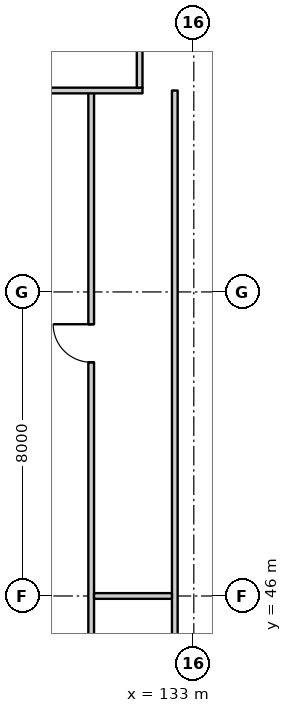
"""IFC4 building model, lengths in metres.
Left out: names, types, materials, properties, quantities, classifications, styles, units other than length and angle.
Written with IfcOpenShell. Run it as: python <this file> out.ifc"""

import sys

from ifc_helpers import new_model, si_unit, direction, frame, frame_2d, origin, place, context, subcontext, project, spatial, rectangle, extrude, element, fill, save


model = new_model("IFC4")
c1 = context("Model", 3, precision=1e-05, world=origin(), true_north=direction((0.0, 1.0)))
c2 = subcontext(c1, "Body", "Model", "MODEL_VIEW")
j1 = project(units=[si_unit("LENGTHUNIT", "METRE"), si_unit("PLANEANGLEUNIT", "RADIAN")], contexts=[c1])
p1 = place(None, origin())
s1 = spatial("IfcSite", under=j1, at=p1, CompositionType="ELEMENT")
p2 = place(p1, origin())
s2 = spatial("IfcBuilding", under=s1, at=p2, CompositionType="ELEMENT")
p3 = place(p2, frame((0.0, 0.0, -5.0)))
s3 = spatial("IfcBuildingStorey", under=s2, at=p3, CompositionType="ELEMENT", Elevation=-5.0)
p4 = place(p3, frame((130.3, 32.7, 0.0), z_axis=(0.0, 0.0, 1.0), x_axis=(0.0, 1.0, 0.0)))
e1 = element("IfcWall", 1, at=p4, inside=s3, PredefinedType="PARTITIONING", context=c2, shape_type="SweptSolid", body=[
    extrude(rectangle(XDim=26.6, YDim=0.15, at=frame_2d((13.3, 0.0))), origin(), (0.0, 0.0, 1.0), 3.9),
])
p5 = place(p4, frame((6.15, 0.0, 0.0)))
e2 = element("IfcOpeningElement", 2, at=p5, cuts=e1, PredefinedType="OPENING", context=c2, shape_type="SweptSolid", body=[
    extrude(rectangle(XDim=1.0, YDim=2.1, at=frame_2d((0.5, 1.05))), frame((0.0, 0.085, 0.0), z_axis=(0.0, -1.0, 0.0), x_axis=(1.0, 0.0, 0.0)), (0.0, 0.0, 1.0), 0.17),
])
p6 = place(p4, frame((19.45, 0.0, 0.0)))
e3 = element("IfcOpeningElement", 3, at=p6, cuts=e1, PredefinedType="OPENING", context=c2, shape_type="SweptSolid", body=[
    extrude(rectangle(XDim=1.0, YDim=2.1, at=frame_2d((0.5, 1.05))), frame((0.0, 0.085, 0.0), z_axis=(0.0, -1.0, 0.0), x_axis=(1.0, 0.0, 0.0)), (0.0, 0.0, 1.0), 0.17),
])
p7 = place(p3, frame((132.5, 32.7, 0.0), z_axis=(0.0, 0.0, 1.0), x_axis=(0.0, 1.0, 0.0)))
e4 = element("IfcWall", 4, at=p7, inside=s3, PredefinedType="PARTITIONING", context=c2, shape_type="SweptSolid", body=[
    extrude(rectangle(XDim=26.6, YDim=0.15, at=frame_2d((13.3, 0.0))), origin(), (0.0, 0.0, 1.0), 3.9),
])
p8 = place(p3, frame((130.375, 46.0, 0.0), z_axis=(0.0, 0.0, 1.0), x_axis=(1.0, 0.0, 0.0)))
e5 = element("IfcWall", 5, at=p8, inside=s3, PredefinedType="PARTITIONING", context=c2, shape_type="SweptSolid", body=[
    extrude(rectangle(XDim=2.05, YDim=0.15, at=frame_2d((1.025, 0.0))), origin(), (0.0, 0.0, 1.0), 4.7),
])
p9 = place(p3, frame((120.925, 59.3, 0.0), z_axis=(0.0, 0.0, 1.0), x_axis=(1.0, 0.0, 0.0)))
e6 = element("IfcWall", 6, at=p9, inside=s3, PredefinedType="PARTITIONING", context=c2, shape_type="SweptSolid", body=[
    extrude(rectangle(XDim=10.725, YDim=0.15, at=frame_2d((5.362, 0.0))), origin(), (0.0, 0.0, 1.0), 3.9),
])
p10 = place(p3, frame((131.575, 59.375, 0.0), z_axis=(0.0, 0.0, 1.0), x_axis=(0.0, 1.0, 0.0)))
e7 = element("IfcWall", 7, at=p10, inside=s3, PredefinedType="PARTITIONING", context=c2, shape_type="SweptSolid", body=[
    extrude(rectangle(XDim=3.55, YDim=0.15, at=frame_2d((1.775, 0.0))), origin(), (0.0, 0.0, 1.0), 4.7),
])
p11 = place(p6, origin())
e8 = element("IfcDoor", 8, at=p11, inside=s3, OperationType="SINGLE_SWING_RIGHT", PredefinedType="DOOR", context=c2, shape_type="SweptSolid", body=[
    extrude(rectangle(XDim=1.0, YDim=2.1, at=frame_2d((0.5, 1.05))), frame((0.0, 0.025, 0.0), z_axis=(0.0, -1.0, 0.0), x_axis=(1.0, 0.0, 0.0)), (0.0, 0.0, 1.0), 0.05),
])
fill(e3, e8)
save(model, sys.argv[1])
